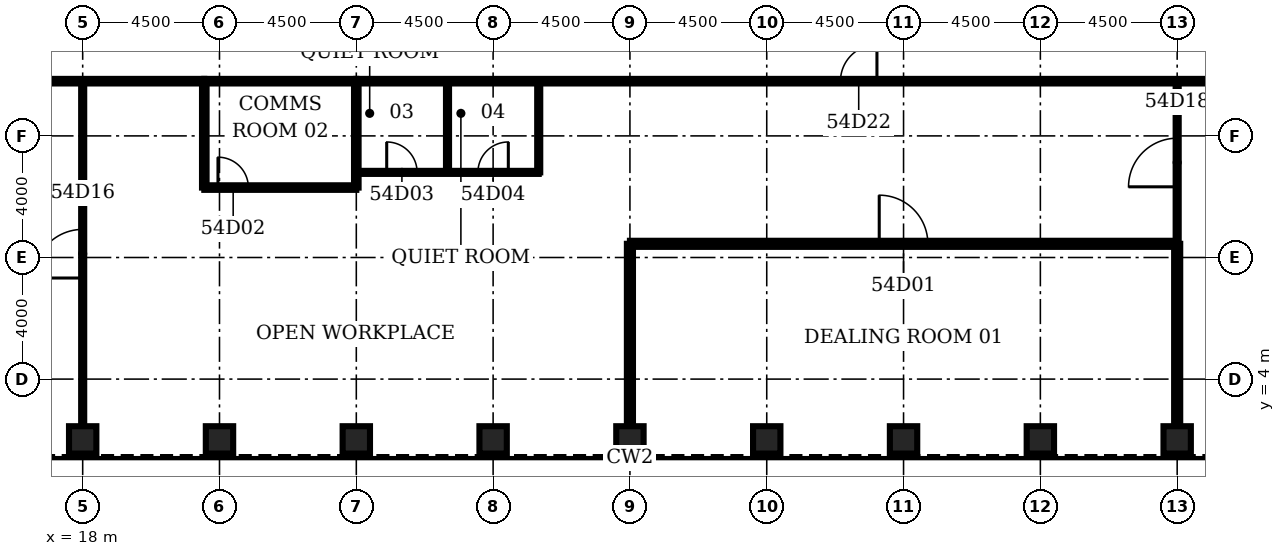
"""IFC4 building model, lengths in metres.
Left out: names, types, materials, properties, quantities, classifications, styles, units other than length and angle.
Written with IfcOpenShell. Run it as: python <this file> out.ifc"""

import sys

from ifc_helpers import new_model, si_unit, direction, frame, frame_2d, origin, origin_2d, place, context, subcontext, project, spatial, rectangle, hollow_rectangle, extrude, element, fill, save


model = new_model("IFC4")
c1 = context("Model", 3, precision=1e-05, world=origin(), true_north=direction((0.0, 1.0)))
c2 = subcontext(c1, "Body", "Model", "MODEL_VIEW")
j1 = project(units=[si_unit("LENGTHUNIT", "METRE"), si_unit("PLANEANGLEUNIT", "RADIAN")], contexts=[c1])
p1 = place(None, origin())
s1 = spatial("IfcSite", under=j1, at=p1, CompositionType="ELEMENT")
p2 = place(p1, origin())
s2 = spatial("IfcBuilding", under=s1, at=p2, CompositionType="ELEMENT")
p3 = place(p2, frame((0.0, 0.0, 240.4)))
s3 = spatial("IfcBuildingStorey", under=s2, at=p3, CompositionType="ELEMENT", Elevation=240.4)
for number, where, z_axis, x_axis in (
    (1, (18.0, 2.0, 0.0), (0.0, 0.0, 1.0), (0.0, 1.0, 0.0)),
    (2, (22.5, 2.0, 0.0), (0.0, 0.0, 1.0), (0.0, 1.0, 0.0)),
    (3, (27.0, 2.0, 0.0), (0.0, 0.0, 1.0), (0.0, 1.0, 0.0)),
    (4, (31.5, 2.0, 0.0), (0.0, 0.0, 1.0), (0.0, 1.0, 0.0)),
    (5, (36.0, 2.0, 0.0), (0.0, 0.0, 1.0), (0.0, 1.0, 0.0)),
    (6, (40.5, 2.0, 0.0), (0.0, 0.0, 1.0), (0.0, 1.0, 0.0)),
    (7, (45.0, 2.0, 0.0), (0.0, 0.0, 1.0), (0.0, 1.0, 0.0)),
    (8, (49.5, 2.0, 0.0), (0.0, 0.0, 1.0), (0.0, 1.0, 0.0)),
    (9, (54.0, 2.0, 0.0), (0.0, 0.0, 1.0), (0.0, 1.0, 0.0)),
):
    element("IfcColumn", number, at=place(p3, frame(where, z_axis=z_axis, x_axis=x_axis)), inside=s3, PredefinedType="COLUMN", context=c2, shape_type="SweptSolid", body=[
        extrude(hollow_rectangle(XDim=0.9, YDim=0.9, WallThickness=0.08, at=origin_2d()), origin(), (0.0, 0.0, 1.0), 4.2),
    ])
p4 = place(p3, frame((36.0, 8.45, 0.0), z_axis=(0.0, 0.0, 1.0), x_axis=(1.0, 0.0, 0.0)))
e10 = element("IfcWall", 10, at=p4, inside=s3, PredefinedType="PARTITIONING", context=c2, shape_type="SweptSolid", body=[
    extrude(rectangle(XDim=18.0, YDim=0.2, at=frame_2d((9.0, 0.0))), origin(), (0.0, 0.0, 1.0), 3.0),
])
p5 = place(p4, frame((8.2, 0.0, 0.0)))
e11 = element("IfcOpeningElement", 11, at=p5, cuts=e10, PredefinedType="OPENING", context=c2, shape_type="SweptSolid", body=[
    extrude(rectangle(XDim=1.6, YDim=2.1, at=frame_2d((0.8, 1.05))), frame((0.0, 0.11, 0.0), z_axis=(0.0, -1.0, 0.0), x_axis=(1.0, 0.0, 0.0)), (0.0, 0.0, 1.0), 0.22),
])
p6 = place(p3, frame((22.0, 10.3, 0.0), z_axis=(0.0, 0.0, 1.0), x_axis=(1.0, 0.0, 0.0)))
e12 = element("IfcWall", 12, at=p6, inside=s3, PredefinedType="PARTITIONING", context=c2, shape_type="SweptSolid", body=[
    extrude(rectangle(XDim=5.0, YDim=0.15, at=frame_2d((2.5, 0.0))), origin(), (0.0, 0.0, 1.0), 3.0),
])
p7 = place(p6, frame((0.45, 0.0, 0.0)))
e13 = element("IfcOpeningElement", 13, at=p7, cuts=e12, PredefinedType="OPENING", context=c2, shape_type="SweptSolid", body=[
    extrude(rectangle(XDim=1.0, YDim=2.1, at=frame_2d((0.5, 1.05))), frame((0.0, 0.085, 0.0), z_axis=(0.0, -1.0, 0.0), x_axis=(1.0, 0.0, 0.0)), (0.0, 0.0, 1.0), 0.17),
])
p8 = place(p3, frame((27.0, 10.8, 0.0), z_axis=(0.0, 0.0, 1.0), x_axis=(1.0, 0.0, 0.0)))
e14 = element("IfcWall", 14, at=p8, inside=s3, PredefinedType="PARTITIONING", context=c2, shape_type="SweptSolid", body=[
    extrude(rectangle(XDim=6.0, YDim=0.1, at=frame_2d((3.0, 0.0))), origin(), (0.0, 0.0, 1.0), 3.0),
])
p9 = place(p8, frame((1.0, 0.0, 0.0)))
e15 = element("IfcOpeningElement", 15, at=p9, cuts=e14, PredefinedType="OPENING", context=c2, shape_type="SweptSolid", body=[
    extrude(rectangle(XDim=1.0, YDim=2.1, at=frame_2d((0.5, 1.05))), frame((0.0, 0.06, 0.0), z_axis=(0.0, -1.0, 0.0), x_axis=(1.0, 0.0, 0.0)), (0.0, 0.0, 1.0), 0.12),
])
p10 = place(p8, frame((4.0, 0.0, 0.0)))
e16 = element("IfcOpeningElement", 16, at=p10, cuts=e14, PredefinedType="OPENING", context=c2, shape_type="SweptSolid", body=[
    extrude(rectangle(XDim=1.0, YDim=2.1, at=frame_2d((0.5, 1.05))), frame((0.0, 0.06, 0.0), z_axis=(0.0, -1.0, 0.0), x_axis=(1.0, 0.0, 0.0)), (0.0, 0.0, 1.0), 0.12),
])
p11 = place(p3, frame((15.2, 13.8, 0.0), z_axis=(0.0, 0.0, 1.0), x_axis=(1.0, 0.0, 0.0)))
e17 = element("IfcWall", 17, at=p11, inside=s3, PredefinedType="PARTITIONING", context=c2, shape_type="SweptSolid", body=[
    extrude(rectangle(XDim=6.8, YDim=0.15, at=frame_2d((3.4, 0.0))), origin(), (0.0, 0.0, 1.0), 3.0),
])
p12 = place(p3, frame((22.0, 13.8, 0.0), z_axis=(0.0, 0.0, 1.0), x_axis=(1.0, 0.0, 0.0)))
e18 = element("IfcWall", 18, at=p12, inside=s3, PredefinedType="PARTITIONING", context=c2, shape_type="SweptSolid", body=[
    extrude(rectangle(XDim=5.0, YDim=0.15, at=frame_2d((2.5, 0.0))), origin(), (0.0, 0.0, 1.0), 3.0),
])
p13 = place(p3, frame((27.0, 13.8, 0.0), z_axis=(0.0, 0.0, 1.0), x_axis=(1.0, 0.0, 0.0)))
e19 = element("IfcWall", 19, at=p13, inside=s3, PredefinedType="PARTITIONING", context=c2, shape_type="SweptSolid", body=[
    extrude(rectangle(XDim=29.8, YDim=0.15, at=frame_2d((14.9, 0.0))), origin(), (0.0, 0.0, 1.0), 3.0),
])
p14 = place(p13, frame((15.925, 0.0, 0.0)))
e20 = element("IfcOpeningElement", 20, at=p14, cuts=e19, PredefinedType="OPENING", context=c2, shape_type="SweptSolid", body=[
    extrude(rectangle(XDim=1.2, YDim=2.1, at=frame_2d((0.6, 1.05))), frame((0.0, 0.085, 0.0), z_axis=(0.0, -1.0, 0.0), x_axis=(1.0, 0.0, 0.0)), (0.0, 0.0, 1.0), 0.17),
])
p15 = place(p3, frame((18.0, 2.45, 0.0), z_axis=(0.0, 0.0, 1.0), x_axis=(0.0, 1.0, 0.0)))
e21 = element("IfcWall", 21, at=p15, inside=s3, PredefinedType="PARTITIONING", context=c2, shape_type="SweptSolid", body=[
    extrude(rectangle(XDim=11.35, YDim=0.1, at=frame_2d((5.675, 0.0))), origin(), (0.0, 0.0, 1.0), 3.0),
])
p16 = place(p15, frame((4.875, 0.0, 0.0)))
e22 = element("IfcOpeningElement", 22, at=p16, cuts=e21, PredefinedType="OPENING", context=c2, shape_type="SweptSolid", body=[
    extrude(rectangle(XDim=1.6, YDim=2.1, at=frame_2d((0.8, 1.05))), frame((0.0, 0.06, 0.0), z_axis=(0.0, -1.0, 0.0), x_axis=(1.0, 0.0, 0.0)), (0.0, 0.0, 1.0), 0.12),
])
for number, where, z_axis, x_axis in (
    (23, (22.0, 10.3, 0.0), (0.0, 0.0, 1.0), (0.0, 1.0, 0.0)),
    (24, (27.0, 10.3, 0.0), (0.0, 0.0, 1.0), (0.0, 1.0, 0.0)),
):
    element("IfcWall", number, at=place(p3, frame(where, z_axis=z_axis, x_axis=x_axis)), inside=s3, PredefinedType="PARTITIONING", context=c2, shape_type="SweptSolid", body=[
        extrude(rectangle(XDim=3.5, YDim=0.15, at=frame_2d((1.75, 0.0))), origin(), (0.0, 0.0, 1.0), 3.0),
    ])
for number, where, z_axis, x_axis in (
    (25, (30.0, 10.8, 0.0), (0.0, 0.0, 1.0), (0.0, 1.0, 0.0)),
    (26, (33.0, 10.8, 0.0), (0.0, 0.0, 1.0), (0.0, 1.0, 0.0)),
):
    element("IfcWall", number, at=place(p3, frame(where, z_axis=z_axis, x_axis=x_axis)), inside=s3, PredefinedType="PARTITIONING", context=c2, shape_type="SweptSolid", body=[
        extrude(rectangle(XDim=3.0, YDim=0.1, at=frame_2d((1.5, 0.0))), origin(), (0.0, 0.0, 1.0), 3.0),
    ])
for number, where, z_axis, x_axis in (
    (27, (36.0, 2.45, 0.0), (0.0, 0.0, 1.0), (0.0, 1.0, 0.0)),
    (28, (54.0, 2.45, 0.0), (0.0, 0.0, 1.0), (0.0, 1.0, 0.0)),
):
    element("IfcWall", number, at=place(p3, frame(where, z_axis=z_axis, x_axis=x_axis)), inside=s3, PredefinedType="PARTITIONING", context=c2, shape_type="SweptSolid", body=[
        extrude(rectangle(XDim=6.0, YDim=0.2, at=frame_2d((3.0, 0.0))), origin(), (0.0, 0.0, 1.0), 3.0),
    ])
p17 = place(p3, frame((54.0, 8.45, 0.0), z_axis=(0.0, 0.0, 1.0), x_axis=(0.0, 1.0, 0.0)))
e29 = element("IfcWall", 29, at=p17, inside=s3, PredefinedType="PARTITIONING", context=c2, shape_type="SweptSolid", body=[
    extrude(rectangle(XDim=5.35, YDim=0.1, at=frame_2d((2.675, 0.0))), origin(), (0.0, 0.0, 1.0), 3.0),
])
p18 = place(p17, frame((1.875, 0.0, 0.0)))
e30 = element("IfcOpeningElement", 30, at=p18, cuts=e29, PredefinedType="OPENING", context=c2, shape_type="SweptSolid", body=[
    extrude(rectangle(XDim=1.6, YDim=2.1, at=frame_2d((0.8, 1.05))), frame((0.0, 0.06, 0.0), z_axis=(0.0, -1.0, 0.0), x_axis=(1.0, 0.0, 0.0)), (0.0, 0.0, 1.0), 0.12),
])
p19 = place(p5, origin())
e31 = element("IfcDoor", 31, at=p19, inside=s3, OperationType="SINGLE_SWING_LEFT", PredefinedType="DOOR", context=c2, shape_type="SweptSolid", body=[
    extrude(rectangle(XDim=1.6, YDim=2.1, at=frame_2d((0.8, 1.05))), frame((0.0, 0.025, 0.0), z_axis=(0.0, -1.0, 0.0), x_axis=(1.0, 0.0, 0.0)), (0.0, 0.0, 1.0), 0.05),
])
fill(e11, e31)
p20 = place(p7, origin())
e32 = element("IfcDoor", 32, at=p20, inside=s3, OperationType="SINGLE_SWING_LEFT", PredefinedType="DOOR", context=c2, shape_type="SweptSolid", body=[
    extrude(rectangle(XDim=1.0, YDim=2.1, at=frame_2d((0.5, 1.05))), frame((0.0, 0.025, 0.0), z_axis=(0.0, -1.0, 0.0), x_axis=(1.0, 0.0, 0.0)), (0.0, 0.0, 1.0), 0.05),
])
fill(e13, e32)
p21 = place(p9, origin())
e33 = element("IfcDoor", 33, at=p21, inside=s3, OperationType="SINGLE_SWING_LEFT", PredefinedType="DOOR", context=c2, shape_type="SweptSolid", body=[
    extrude(rectangle(XDim=1.0, YDim=2.1, at=frame_2d((0.5, 1.05))), frame((0.0, 0.025, 0.0), z_axis=(0.0, -1.0, 0.0), x_axis=(1.0, 0.0, 0.0)), (0.0, 0.0, 1.0), 0.05),
])
fill(e15, e33)
p22 = place(p10, origin())
e34 = element("IfcDoor", 34, at=p22, inside=s3, OperationType="SINGLE_SWING_RIGHT", PredefinedType="DOOR", context=c2, shape_type="SweptSolid", body=[
    extrude(rectangle(XDim=1.0, YDim=2.1, at=frame_2d((0.5, 1.05))), frame((0.0, 0.025, 0.0), z_axis=(0.0, -1.0, 0.0), x_axis=(1.0, 0.0, 0.0)), (0.0, 0.0, 1.0), 0.05),
])
fill(e16, e34)
p23 = place(p16, origin())
e35 = element("IfcDoor", 35, at=p23, inside=s3, OperationType="SINGLE_SWING_LEFT", PredefinedType="DOOR", context=c2, shape_type="SweptSolid", body=[
    extrude(rectangle(XDim=1.6, YDim=2.1, at=frame_2d((0.8, 1.05))), frame((0.0, 0.025, 0.0), z_axis=(0.0, -1.0, 0.0), x_axis=(1.0, 0.0, 0.0)), (0.0, 0.0, 1.0), 0.05),
])
fill(e22, e35)
p24 = place(p18, origin())
e36 = element("IfcDoor", 36, at=p24, inside=s3, OperationType="SINGLE_SWING_LEFT", PredefinedType="DOOR", context=c2, shape_type="SweptSolid", body=[
    extrude(rectangle(XDim=1.6, YDim=2.1, at=frame_2d((0.8, 1.05))), frame((0.0, 0.025, 0.0), z_axis=(0.0, -1.0, 0.0), x_axis=(1.0, 0.0, 0.0)), (0.0, 0.0, 1.0), 0.05),
])
fill(e30, e36)
p25 = place(p14, origin())
e37 = element("IfcDoor", 37, at=p25, inside=s3, OperationType="SINGLE_SWING_RIGHT", PredefinedType="DOOR", context=c2, shape_type="SweptSolid", body=[
    extrude(rectangle(XDim=1.2, YDim=2.1, at=frame_2d((0.6, 1.05))), frame((0.0, 0.025, 0.0), z_axis=(0.0, -1.0, 0.0), x_axis=(1.0, 0.0, 0.0)), (0.0, 0.0, 1.0), 0.05),
])
fill(e20, e37)
save(model, sys.argv[1])
